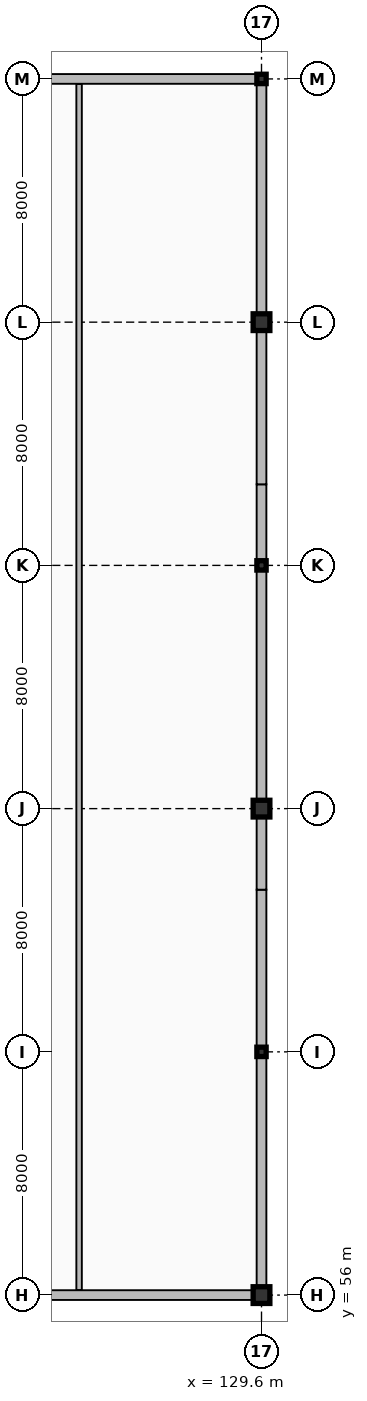
"""IFC4 building model, lengths in metres.
Left out: names, types, materials, properties, quantities, classifications, styles, units other than length and angle.
Written with IfcOpenShell. Run it as: python <this file> out.ifc"""

import sys

from ifc_helpers import new_model, si_unit, direction, frame, frame_2d, origin, origin_2d, place, context, subcontext, project, spatial, rectangle, i_section, extrude, element, fill, save


model = new_model("IFC4")
c1 = context("Model", 3, precision=1e-05, world=origin(), true_north=direction((0.0, 1.0)))
c2 = subcontext(c1, "Body", "Model", "MODEL_VIEW")
j1 = project(units=[si_unit("LENGTHUNIT", "METRE"), si_unit("PLANEANGLEUNIT", "RADIAN")], contexts=[c1])
p1 = place(None, origin())
s1 = spatial("IfcSite", under=j1, at=p1, CompositionType="ELEMENT")
p2 = place(p1, origin())
s2 = spatial("IfcBuilding", under=s1, at=p2, CompositionType="ELEMENT")
p3 = place(p2, frame((0.0, 0.0, 14.7)))
s3 = spatial("IfcBuildingStorey", under=s2, at=p3, CompositionType="ELEMENT", Elevation=14.7)
p4 = place(p3, frame((129.6, 56.0, 0.0), z_axis=(0.0, 0.0, 1.0), x_axis=(1.0, 0.0, 0.0)))
e1 = element("IfcColumn", 1, at=p4, inside=s3, PredefinedType="COLUMN", context=c2, shape_type="SweptSolid", body=[
    extrude(rectangle(XDim=0.55, YDim=0.55, at=origin_2d()), origin(), (0.0, 0.0, 1.0), 5.1),
])
p5 = place(p3, frame((129.6, 64.0, 0.0), z_axis=(0.0, 0.0, 1.0), x_axis=(1.0, 0.0, 0.0)))
e2 = element("IfcColumn", 2, at=p5, inside=s3, PredefinedType="COLUMN", context=c2, shape_type="SweptSolid", body=[
    extrude(i_section(OverallWidth=0.305, OverallDepth=0.308, WebThickness=0.01, FlangeThickness=0.015, FilletRadius=0.015, at=origin_2d()), origin(), (0.0, 0.0, 1.0), 5.1),
])
p6 = place(p3, frame((129.6, 72.0, 0.0), z_axis=(0.0, 0.0, 1.0), x_axis=(1.0, 0.0, 0.0)))
e3 = element("IfcColumn", 3, at=p6, inside=s3, PredefinedType="COLUMN", context=c2, shape_type="SweptSolid", body=[
    extrude(rectangle(XDim=0.55, YDim=0.55, at=origin_2d()), origin(), (0.0, 0.0, 1.0), 5.1),
])
p7 = place(p3, frame((129.6, 80.0, 0.0), z_axis=(0.0, 0.0, 1.0), x_axis=(1.0, 0.0, 0.0)))
e4 = element("IfcColumn", 4, at=p7, inside=s3, PredefinedType="COLUMN", context=c2, shape_type="SweptSolid", body=[
    extrude(i_section(OverallWidth=0.305, OverallDepth=0.308, WebThickness=0.01, FlangeThickness=0.015, FilletRadius=0.015, at=origin_2d()), origin(), (0.0, 0.0, 1.0), 5.1),
])
p8 = place(p3, frame((129.6, 88.0, 0.0), z_axis=(0.0, 0.0, 1.0), x_axis=(1.0, 0.0, 0.0)))
e5 = element("IfcColumn", 5, at=p8, inside=s3, PredefinedType="COLUMN", context=c2, shape_type="SweptSolid", body=[
    extrude(rectangle(XDim=0.55, YDim=0.55, at=origin_2d()), origin(), (0.0, 0.0, 1.0), 5.1),
])
p9 = place(p3, frame((129.6, 96.0, 0.0), z_axis=(0.0, 0.0, 1.0), x_axis=(1.0, 0.0, 0.0)))
e6 = element("IfcColumn", 6, at=p9, inside=s3, PredefinedType="COLUMN", context=c2, shape_type="SweptSolid", body=[
    extrude(i_section(OverallWidth=0.305, OverallDepth=0.308, WebThickness=0.01, FlangeThickness=0.015, FilletRadius=0.015, at=origin_2d()), origin(), (0.0, 0.0, 1.0), 5.1),
])
p10 = place(p3, frame((117.45, 56.0, 0.0), z_axis=(0.0, 0.0, 1.0), x_axis=(1.0, 0.0, 0.0)))
e7 = element("IfcWall", 7, at=p10, inside=s3, PredefinedType="SOLIDWALL", context=c2, shape_type="SweptSolid", body=[
    extrude(rectangle(XDim=12.15, YDim=0.32, at=frame_2d((6.075, 0.0))), origin(), (0.0, 0.0, 1.0), 4.144),
])
p11 = place(p10, frame((3.6, 0.0, 0.95)))
e8 = element("IfcOpeningElement", 8, at=p11, cuts=e7, PredefinedType="OPENING", context=c2, shape_type="SweptSolid", body=[
    extrude(rectangle(XDim=1.35, YDim=1.8, at=frame_2d((0.675, 0.9))), frame((0.0, 0.17, 0.0), z_axis=(0.0, -1.0, 0.0), x_axis=(1.0, 0.0, 0.0)), (0.0, 0.0, 1.0), 0.34),
])
p12 = place(p3, frame((129.6, 56.0, 0.0), z_axis=(0.0, 0.0, 1.0), x_axis=(0.0, 1.0, 0.0)))
e9 = element("IfcWall", 9, at=p12, inside=s3, PredefinedType="SOLIDWALL", context=c2, shape_type="SweptSolid", body=[
    extrude(rectangle(XDim=13.333, YDim=0.32, at=frame_2d((6.667, 0.0))), origin(), (0.0, 0.0, 1.0), 4.369),
])
p13 = place(p12, frame((4.05, 0.0, 0.85)))
e10 = element("IfcOpeningElement", 10, at=p13, cuts=e9, PredefinedType="OPENING", context=c2, shape_type="SweptSolid", body=[
    extrude(rectangle(XDim=1.35, YDim=2.1, at=frame_2d((0.675, 1.05))), frame((0.0, 0.17, 0.0), z_axis=(0.0, -1.0, 0.0), x_axis=(1.0, 0.0, 0.0)), (0.0, 0.0, 1.0), 0.34),
])
p14 = place(p3, frame((129.6, 69.333, 0.0), z_axis=(0.0, 0.0, 1.0), x_axis=(0.0, 1.0, 0.0)))
e11 = element("IfcWall", 11, at=p14, inside=s3, PredefinedType="SOLIDWALL", context=c2, shape_type="SweptSolid", body=[
    extrude(rectangle(XDim=13.333, YDim=0.32, at=frame_2d((6.667, 0.0))), origin(), (0.0, 0.0, 1.0), 4.332),
])
p15 = place(p14, frame((5.85, 0.0, 0.95)))
e12 = element("IfcOpeningElement", 12, at=p15, cuts=e11, PredefinedType="OPENING", context=c2, shape_type="SweptSolid", body=[
    extrude(rectangle(XDim=1.5, YDim=1.8, at=frame_2d((0.75, 0.9))), frame((0.0, 0.17, 0.0), z_axis=(0.0, -1.0, 0.0), x_axis=(1.0, 0.0, 0.0)), (0.0, 0.0, 1.0), 0.34),
])
p16 = place(p3, frame((129.6, 82.667, 0.0), z_axis=(0.0, 0.0, 1.0), x_axis=(0.0, 1.0, 0.0)))
e13 = element("IfcWall", 13, at=p16, inside=s3, PredefinedType="SOLIDWALL", context=c2, shape_type="SweptSolid", body=[
    extrude(rectangle(XDim=13.333, YDim=0.32, at=frame_2d((6.667, 0.0))), origin(), (0.0, 0.0, 1.0), 4.369),
])
p17 = place(p16, frame((8.1, 0.0, 0.95)))
e14 = element("IfcOpeningElement", 14, at=p17, cuts=e13, PredefinedType="OPENING", context=c2, shape_type="SweptSolid", body=[
    extrude(rectangle(XDim=1.8, YDim=1.5, at=frame_2d((0.9, 0.75))), frame((0.0, 0.17, 0.0), z_axis=(0.0, -1.0, 0.0), x_axis=(1.0, 0.0, 0.0)), (0.0, 0.0, 1.0), 0.34),
])
p18 = place(p3, frame((129.6, 96.0, 0.0), z_axis=(0.0, 0.0, 1.0), x_axis=(-1.0, 0.0, 0.0)))
e15 = element("IfcWall", 15, at=p18, inside=s3, PredefinedType="SOLIDWALL", context=c2, shape_type="SweptSolid", body=[
    extrude(rectangle(XDim=12.06, YDim=0.32, at=frame_2d((6.03, 0.0))), origin(), (0.0, 0.0, 1.0), 4.144),
])
p19 = place(p18, frame((3.15, 0.0, 0.95)))
e16 = element("IfcOpeningElement", 16, at=p19, cuts=e15, PredefinedType="OPENING", context=c2, shape_type="SweptSolid", body=[
    extrude(rectangle(XDim=1.8, YDim=1.8, at=frame_2d((0.9, 0.9))), frame((0.0, 0.17, 0.0), z_axis=(0.0, -1.0, 0.0), x_axis=(1.0, 0.0, 0.0)), (0.0, 0.0, 1.0), 0.34),
])
p20 = place(p3, frame((123.6, 56.168, 0.0), z_axis=(0.0, 0.0, 1.0), x_axis=(0.0, 1.0, 0.0)))
e17 = element("IfcWall", 17, at=p20, inside=s3, PredefinedType="PARTITIONING", context=c2, shape_type="SweptSolid", body=[
    extrude(rectangle(XDim=39.664, YDim=0.18, at=frame_2d((19.832, 0.0))), origin(), (0.0, 0.0, 1.0), 4.84),
])
p21 = place(p20, frame((19.232, 0.0, 0.0)))
e18 = element("IfcOpeningElement", 18, at=p21, cuts=e17, PredefinedType="OPENING", context=c2, shape_type="SweptSolid", body=[
    extrude(rectangle(XDim=1.2, YDim=2.3, at=frame_2d((0.6, 1.15))), frame((0.0, 0.1, 0.0), z_axis=(0.0, -1.0, 0.0), x_axis=(1.0, 0.0, 0.0)), (0.0, 0.0, 1.0), 0.2),
])
p22 = place(p13, origin())
e19 = element("IfcWindow", 19, at=p22, inside=s3, PartitioningType="DOUBLE_PANEL_VERTICAL", PredefinedType="WINDOW", context=c2, shape_type="SweptSolid", body=[
    extrude(rectangle(XDim=1.35, YDim=2.1, at=frame_2d((0.675, 1.05))), frame((0.0, 0.03, 0.0), z_axis=(0.0, -1.0, 0.0), x_axis=(1.0, 0.0, 0.0)), (0.0, 0.0, 1.0), 0.06),
])
fill(e10, e19)
p23 = place(p15, origin())
e20 = element("IfcWindow", 20, at=p23, inside=s3, PartitioningType="DOUBLE_PANEL_VERTICAL", PredefinedType="WINDOW", context=c2, shape_type="SweptSolid", body=[
    extrude(rectangle(XDim=1.5, YDim=1.8, at=frame_2d((0.75, 0.9))), frame((0.0, 0.03, 0.0), z_axis=(0.0, -1.0, 0.0), x_axis=(1.0, 0.0, 0.0)), (0.0, 0.0, 1.0), 0.06),
])
fill(e12, e20)
p24 = place(p17, origin())
e21 = element("IfcWindow", 21, at=p24, inside=s3, PartitioningType="DOUBLE_PANEL_VERTICAL", PredefinedType="WINDOW", context=c2, shape_type="SweptSolid", body=[
    extrude(rectangle(XDim=1.8, YDim=1.5, at=frame_2d((0.9, 0.75))), frame((0.0, 0.03, 0.0), z_axis=(0.0, -1.0, 0.0), x_axis=(1.0, 0.0, 0.0)), (0.0, 0.0, 1.0), 0.06),
])
fill(e14, e21)
p25 = place(p19, origin())
e22 = element("IfcWindow", 22, at=p25, inside=s3, PartitioningType="DOUBLE_PANEL_VERTICAL", PredefinedType="WINDOW", context=c2, shape_type="SweptSolid", body=[
    extrude(rectangle(XDim=1.8, YDim=1.8, at=frame_2d((0.9, 0.9))), frame((0.0, 0.03, 0.0), z_axis=(0.0, -1.0, 0.0), x_axis=(1.0, 0.0, 0.0)), (0.0, 0.0, 1.0), 0.06),
])
fill(e16, e22)
p26 = place(p21, frame((1.2, 0.0, 0.0), z_axis=(0.0, 0.0, 1.0), x_axis=(-1.0, 0.0, 0.0)))
e23 = element("IfcDoor", 23, at=p26, inside=s3, OperationType="SINGLE_SWING_RIGHT", PredefinedType="DOOR", context=c2, shape_type="SweptSolid", body=[
    extrude(rectangle(XDim=1.2, YDim=2.3, at=frame_2d((0.6, 1.15))), frame((0.0, 0.025, 0.0), z_axis=(0.0, -1.0, 0.0), x_axis=(1.0, 0.0, 0.0)), (0.0, 0.0, 1.0), 0.05),
])
fill(e18, e23)
save(model, sys.argv[1])
